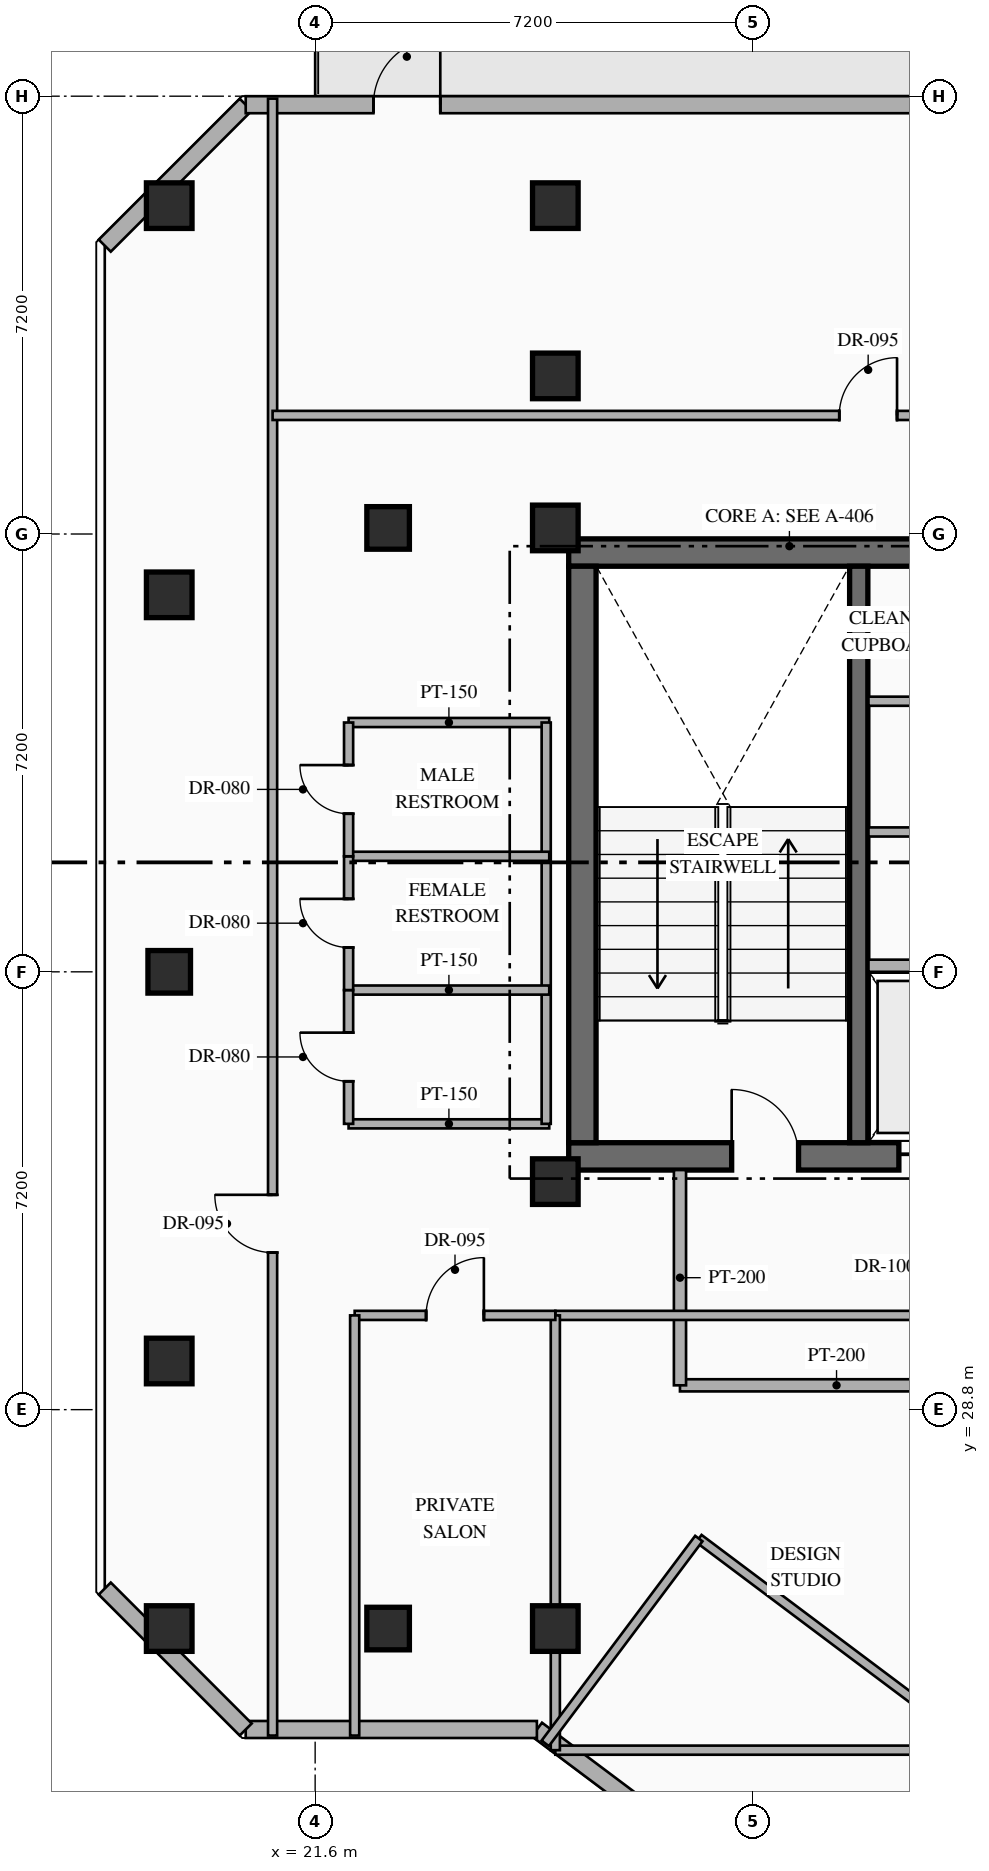
"""IFC4 building model, lengths in metres.
Left out: names, types, materials, properties, quantities, classifications, styles, units other than length and angle.
Written with IfcOpenShell. Run it as: python <this file> out.ifc"""

import sys

from ifc_helpers import new_model, si_unit, direction, frame, frame_2d, origin, origin_2d, place, context, subcontext, project, spatial, rectangle, hollow_rectangle, extrude, element, fill, save


model = new_model("IFC4")
c1 = context("Model", 3, precision=1e-05, world=origin(), true_north=direction((0.0, 1.0)))
c2 = subcontext(c1, "Body", "Model", "MODEL_VIEW")
j1 = project(units=[si_unit("LENGTHUNIT", "METRE"), si_unit("PLANEANGLEUNIT", "RADIAN")], contexts=[c1])
p1 = place(None, origin())
s1 = spatial("IfcSite", under=j1, at=p1, CompositionType="ELEMENT")
p2 = place(p1, origin())
s2 = spatial("IfcBuilding", under=s1, at=p2, CompositionType="ELEMENT")
p3 = place(p2, frame((0.0, 0.0, 205.95)))
s3 = spatial("IfcBuildingStorey", under=s2, at=p3, CompositionType="ELEMENT", Elevation=205.95)
p4 = place(p3, frame((25.77, 32.965, 0.0), z_axis=(0.0, 0.0, 1.0), x_axis=(1.0, 0.0, 0.0)))
e1 = element("IfcWall", 1, at=p4, inside=s3, PredefinedType="SHEAR", context=c2, shape_type="SweptSolid", body=[
    extrude(rectangle(XDim=7.48, YDim=0.45, at=frame_2d((3.74, 0.0))), origin(), (0.0, 0.0, 1.0), 3.6),
])
p5 = place(p4, frame((2.68, 0.0, 0.0)))
e2 = element("IfcOpeningElement", 2, at=p5, cuts=e1, PredefinedType="OPENING", context=c2, shape_type="SweptSolid", body=[
    extrude(rectangle(XDim=1.1, YDim=2.2, at=frame_2d((0.55, 1.1))), frame((0.0, 0.235, 0.0), z_axis=(0.0, -1.0, 0.0), x_axis=(1.0, 0.0, 0.0)), (0.0, 0.0, 1.0), 0.47),
])
p6 = place(p4, frame((5.43, 0.0, 0.0)))
e3 = element("IfcOpeningElement", 3, at=p6, cuts=e1, PredefinedType="OPENING", context=c2, shape_type="SweptSolid", body=[
    extrude(rectangle(XDim=1.1, YDim=2.15, at=frame_2d((0.55, 1.075))), frame((0.0, 0.235, 0.0), z_axis=(0.0, -1.0, 0.0), x_axis=(1.0, 0.0, 0.0)), (0.0, 0.0, 1.0), 0.47),
])
p7 = place(p3, frame((25.77, 42.895, 0.0), z_axis=(0.0, 0.0, 1.0), x_axis=(1.0, 0.0, 0.0)))
e4 = element("IfcWall", 4, at=p7, inside=s3, PredefinedType="SHEAR", context=c2, shape_type="SweptSolid", body=[
    extrude(rectangle(XDim=7.48, YDim=0.45, at=frame_2d((3.74, 0.0))), origin(), (0.0, 0.0, 1.0), 3.6),
])
p8 = place(p3, frame((25.995, 33.19, 0.0), z_axis=(0.0, 0.0, 1.0), x_axis=(0.0, 1.0, 0.0)))
e5 = element("IfcWall", 5, at=p8, inside=s3, PredefinedType="SHEAR", context=c2, shape_type="SweptSolid", body=[
    extrude(rectangle(XDim=9.48, YDim=0.45, at=frame_2d((4.74, 0.0))), origin(), (0.0, 0.0, 1.0), 3.6),
])
p9 = place(p3, frame((30.54, 33.19, 0.0), z_axis=(0.0, 0.0, 1.0), x_axis=(0.0, 1.0, 0.0)))
e6 = element("IfcWall", 6, at=p9, inside=s3, PredefinedType="SHEAR", context=c2, shape_type="SweptSolid", body=[
    extrude(rectangle(XDim=9.48, YDim=0.3, at=frame_2d((4.74, 0.0))), origin(), (0.0, 0.0, 1.0), 3.6),
])
for number, where, z_axis, x_axis in (
    (7, (25.55, 32.55, 0.0), (0.0, 0.0, 1.0), (1.0, 0.0, 0.0)),
    (8, (25.55, 43.3, 0.0), (0.0, 0.0, 1.0), (1.0, 0.0, 0.0)),
    (9, (25.55, 25.2, 0.0), (0.0, 0.0, 1.0), (1.0, 0.0, 0.0)),
    (10, (25.55, 45.8, 0.0), (0.0, 0.0, 1.0), (1.0, 0.0, 0.0)),
    (11, (19.2, 48.6, 0.0), (0.0, 0.0, 1.0), (1.0, 0.0, 0.0)),
    (12, (25.55, 48.6, 0.0), (0.0, 0.0, 1.0), (1.0, 0.0, 0.0)),
    (13, (19.2, 25.2, 0.0), (0.0, 0.0, 1.0), (1.0, 0.0, 0.0)),
    (14, (19.2, 29.6, 0.0), (0.0, 0.0, 1.0), (1.0, 0.0, 0.0)),
    (15, (19.2, 42.2, 0.0), (0.0, 0.0, 1.0), (1.0, 0.0, 0.0)),
):
    element("IfcColumn", number, at=place(p3, frame(where, z_axis=z_axis, x_axis=x_axis)), inside=s3, PredefinedType="COLUMN", context=c2, shape_type="SweptSolid", body=[
        extrude(hollow_rectangle(XDim=0.75, YDim=0.75, WallThickness=0.028, at=origin_2d()), origin(), (0.0, 0.0, 1.0), 3.6),
    ])
for number, where, z_axis, x_axis in (
    (16, (22.8, 25.2, 0.0), (0.0, 0.0, 1.0), (1.0, 0.0, 0.0)),
    (17, (22.8, 43.3, 0.0), (0.0, 0.0, 1.0), (1.0, 0.0, 0.0)),
    (18, (19.2, 36.0, 0.0), (0.0, 0.0, 1.0), (1.0, 0.0, 0.0)),
):
    element("IfcColumn", number, at=place(p3, frame(where, z_axis=z_axis, x_axis=x_axis)), inside=s3, PredefinedType="COLUMN", context=c2, shape_type="SweptSolid", body=[
        extrude(hollow_rectangle(XDim=0.7, YDim=0.7, WallThickness=0.028, at=origin_2d()), origin(), (0.0, 0.0, 1.0), 3.6),
    ])
p10 = place(p3, frame((44.918, 8.787, 0.0), z_axis=(0.0, 0.0, 1.0), x_axis=(-0.800004765927, 0.599993645378, 0.0)))
e19 = element("IfcWall", 19, at=p10, inside=s3, PredefinedType="STANDARD", context=c2, shape_type="SweptSolid", body=[
    extrude(rectangle(XDim=24.588, YDim=0.28, at=frame_2d((12.294, 0.0))), origin(), (0.0, 0.0, 1.0), 3.35),
])
p11 = place(p3, frame((25.247, 23.54, 0.0), z_axis=(0.0, 0.0, 1.0), x_axis=(-1.0, 0.0, 0.0)))
e20 = element("IfcWall", 20, at=p11, inside=s3, PredefinedType="STANDARD", context=c2, shape_type="SweptSolid", body=[
    extrude(rectangle(XDim=4.789, YDim=0.28, at=frame_2d((2.395, 0.0))), origin(), (0.0, 0.0, 1.0), 3.35),
])
p12 = place(p3, frame((20.458, 23.54, 0.0), z_axis=(0.0, 0.0, 1.0), x_axis=(-0.707144017911, 0.707069542501, 0.0)))
e21 = element("IfcWall", 21, at=p12, inside=s3, PredefinedType="STANDARD", context=c2, shape_type="SweptSolid", body=[
    extrude(rectangle(XDim=3.278, YDim=0.28, at=frame_2d((1.639, 0.0))), origin(), (0.0, 0.0, 1.0), 3.35),
])
p13 = place(p3, frame((18.14, 47.942, 0.0), z_axis=(0.0, 0.0, 1.0), x_axis=(0.707106781187, 0.707106781187, 0.0)))
e22 = element("IfcWall", 22, at=p13, inside=s3, PredefinedType="STANDARD", context=c2, shape_type="SweptSolid", body=[
    extrude(rectangle(XDim=3.278, YDim=0.28, at=frame_2d((1.639, 0.0))), origin(), (0.0, 0.0, 1.0), 3.35),
])
p14 = place(p3, frame((20.458, 50.26, 0.0), z_axis=(0.0, 0.0, 1.0), x_axis=(1.0, 0.0, 0.0)))
e23 = element("IfcWall", 23, at=p14, inside=s3, PredefinedType="STANDARD", context=c2, shape_type="SweptSolid", body=[
    extrude(rectangle(XDim=22.084, YDim=0.28, at=frame_2d((11.042, 0.0))), origin(), (0.0, 0.0, 1.0), 3.35),
])
p15 = place(p14, frame((2.1, 0.0, 0.0)))
e24 = element("IfcOpeningElement", 24, at=p15, cuts=e23, PredefinedType="OPENING", context=c2, shape_type="SweptSolid", body=[
    extrude(rectangle(XDim=1.1, YDim=2.2, at=frame_2d((0.55, 1.1))), frame((0.0, 0.15, 0.0), z_axis=(0.0, -1.0, 0.0), x_axis=(1.0, 0.0, 0.0)), (0.0, 0.0, 1.0), 0.3),
])
p16 = place(p14, frame((15.663, 0.0, 0.85)))
e25 = element("IfcOpeningElement", 25, at=p16, cuts=e23, PredefinedType="OPENING", context=c2, shape_type="SweptSolid", body=[
    extrude(rectangle(XDim=1.8, YDim=2.1, at=frame_2d((0.9, 1.05))), frame((0.0, 0.15, 0.0), z_axis=(0.0, -1.0, 0.0), x_axis=(1.0, 0.0, 0.0)), (0.0, 0.0, 1.0), 0.3),
])
p17 = place(p3, frame((30.7, 36.1, 0.0), z_axis=(0.0, 0.0, 1.0), x_axis=(1.0, 0.0, 0.0)))
e26 = element("IfcWall", 26, at=p17, inside=s3, PredefinedType="STANDARD", context=c2, shape_type="SweptSolid", body=[
    extrude(rectangle(XDim=2.1, YDim=0.2, at=frame_2d((1.05, 0.0))), origin(), (0.0, 0.0, 1.0), 3.35),
])
for number, where, z_axis, x_axis in (
    (27, (30.7, 38.3, 0.0), (0.0, 0.0, 1.0), (1.0, 0.0, 0.0)),
    (28, (30.7, 40.45, 0.0), (0.0, 0.0, 1.0), (1.0, 0.0, 0.0)),
):
    element("IfcWall", number, at=place(p3, frame(where, z_axis=z_axis, x_axis=x_axis)), inside=s3, PredefinedType="PARTITIONING", context=c2, shape_type="SweptSolid", body=[
        extrude(rectangle(XDim=2.1, YDim=0.15, at=frame_2d((1.05, 0.0))), origin(), (0.0, 0.0, 1.0), 3.35),
    ])
p18 = place(p3, frame((27.6, 29.2, 0.0), z_axis=(0.0, 0.0, 1.0), x_axis=(1.0, 0.0, 0.0)))
e29 = element("IfcWall", 29, at=p18, inside=s3, PredefinedType="STANDARD", context=c2, shape_type="SweptSolid", body=[
    extrude(rectangle(XDim=5.15, YDim=0.2, at=frame_2d((2.575, 0.0))), origin(), (0.0, 0.0, 1.0), 3.35),
])
p19 = place(p3, frame((27.6, 29.2, 0.0), z_axis=(0.0, 0.0, 1.0), x_axis=(0.0, 1.0, 0.0)))
e30 = element("IfcWall", 30, at=p19, inside=s3, PredefinedType="STANDARD", context=c2, shape_type="SweptSolid", body=[
    extrude(rectangle(XDim=3.54, YDim=0.2, at=frame_2d((1.77, 0.0))), origin(), (0.0, 0.0, 1.0), 3.35),
])
for number, where, z_axis, x_axis in (
    (31, (22.15, 33.5, 0.0), (0.0, 0.0, 1.0), (1.0, 0.0, 0.0)),
    (32, (22.15, 40.1, 0.0), (0.0, 0.0, 1.0), (1.0, 0.0, 0.0)),
):
    element("IfcWall", number, at=place(p3, frame(where, z_axis=z_axis, x_axis=x_axis)), inside=s3, PredefinedType="PARTITIONING", context=c2, shape_type="SweptSolid", body=[
        extrude(rectangle(XDim=3.3, YDim=0.15, at=frame_2d((1.65, 0.0))), origin(), (0.0, 0.0, 1.0), 3.35),
    ])
p20 = place(p3, frame((25.4, 33.5, 0.0), z_axis=(0.0, 0.0, 1.0), x_axis=(0.0, 1.0, 0.0)))
e33 = element("IfcWall", 33, at=p20, inside=s3, PredefinedType="PARTITIONING", context=c2, shape_type="SweptSolid", body=[
    extrude(rectangle(XDim=6.6, YDim=0.15, at=frame_2d((3.3, 0.0))), origin(), (0.0, 0.0, 1.0), 3.35),
])
for number, where, z_axis, x_axis in (
    (34, (22.15, 35.7, 0.0), (0.0, 0.0, 1.0), (1.0, 0.0, 0.0)),
    (35, (22.15, 37.9, 0.0), (0.0, 0.0, 1.0), (1.0, 0.0, 0.0)),
):
    element("IfcWall", number, at=place(p3, frame(where, z_axis=z_axis, x_axis=x_axis)), inside=s3, PredefinedType="PARTITIONING", context=c2, shape_type="SweptSolid", body=[
        extrude(rectangle(XDim=3.3, YDim=0.15, at=frame_2d((1.65, 0.0))), origin(), (0.0, 0.0, 1.0), 3.35),
    ])
p21 = place(p3, frame((22.15, 33.5, 0.0), z_axis=(0.0, 0.0, 1.0), x_axis=(0.0, 1.0, 0.0)))
e36 = element("IfcWall", 36, at=p21, inside=s3, PredefinedType="PARTITIONING", context=c2, shape_type="SweptSolid", body=[
    extrude(rectangle(XDim=2.2, YDim=0.15, at=frame_2d((1.1, 0.0))), origin(), (0.0, 0.0, 1.0), 3.35),
])
p22 = place(p21, frame((0.7, 0.0, 0.0)))
e37 = element("IfcOpeningElement", 37, at=p22, cuts=e36, PredefinedType="OPENING", context=c2, shape_type="SweptSolid", body=[
    extrude(rectangle(XDim=0.8, YDim=2.06, at=frame_2d((0.4, 1.03))), frame((0.0, 0.085, 0.0), z_axis=(0.0, -1.0, 0.0), x_axis=(1.0, 0.0, 0.0)), (0.0, 0.0, 1.0), 0.17),
])
p23 = place(p3, frame((22.15, 35.7, 0.0), z_axis=(0.0, 0.0, 1.0), x_axis=(0.0, 1.0, 0.0)))
e38 = element("IfcWall", 38, at=p23, inside=s3, PredefinedType="PARTITIONING", context=c2, shape_type="SweptSolid", body=[
    extrude(rectangle(XDim=2.2, YDim=0.15, at=frame_2d((1.1, 0.0))), origin(), (0.0, 0.0, 1.0), 3.35),
])
p24 = place(p23, frame((0.7, 0.0, 0.0)))
e39 = element("IfcOpeningElement", 39, at=p24, cuts=e38, PredefinedType="OPENING", context=c2, shape_type="SweptSolid", body=[
    extrude(rectangle(XDim=0.8, YDim=2.06, at=frame_2d((0.4, 1.03))), frame((0.0, 0.085, 0.0), z_axis=(0.0, -1.0, 0.0), x_axis=(1.0, 0.0, 0.0)), (0.0, 0.0, 1.0), 0.17),
])
p25 = place(p3, frame((22.15, 37.9, 0.0), z_axis=(0.0, 0.0, 1.0), x_axis=(0.0, 1.0, 0.0)))
e40 = element("IfcWall", 40, at=p25, inside=s3, PredefinedType="PARTITIONING", context=c2, shape_type="SweptSolid", body=[
    extrude(rectangle(XDim=2.2, YDim=0.15, at=frame_2d((1.1, 0.0))), origin(), (0.0, 0.0, 1.0), 3.35),
])
p26 = place(p25, frame((0.7, 0.0, 0.0)))
e41 = element("IfcOpeningElement", 41, at=p26, cuts=e40, PredefinedType="OPENING", context=c2, shape_type="SweptSolid", body=[
    extrude(rectangle(XDim=0.8, YDim=2.06, at=frame_2d((0.4, 1.03))), frame((0.0, 0.085, 0.0), z_axis=(0.0, -1.0, 0.0), x_axis=(1.0, 0.0, 0.0)), (0.0, 0.0, 1.0), 0.17),
])
p27 = place(p3, frame((25.55, 23.2, 0.0), z_axis=(0.0, 0.0, 1.0), x_axis=(1.0, 0.0, 0.0)))
e42 = element("IfcWall", 42, at=p27, inside=s3, PredefinedType="PARTITIONING", context=c2, shape_type="SweptSolid", body=[
    extrude(rectangle(XDim=9.4, YDim=0.15, at=frame_2d((4.7, 0.0))), origin(), (0.0, 0.0, 1.0), 3.35),
])
p28 = place(p3, frame((25.55, 30.35, 0.0), z_axis=(0.0, 0.0, 1.0), x_axis=(1.0, 0.0, 0.0)))
e43 = element("IfcWall", 43, at=p28, inside=s3, PredefinedType="PARTITIONING", context=c2, shape_type="SweptSolid", body=[
    extrude(rectangle(XDim=9.4, YDim=0.15, at=frame_2d((4.7, 0.0))), origin(), (0.0, 0.0, 1.0), 3.35),
])
p29 = place(p28, frame((7.638, 0.0, 0.0)))
e44 = element("IfcOpeningElement", 44, at=p29, cuts=e43, PredefinedType="OPENING", context=c2, shape_type="SweptSolid", body=[
    extrude(rectangle(XDim=1.0, YDim=2.15, at=frame_2d((0.5, 1.075))), frame((0.0, 0.085, 0.0), z_axis=(0.0, -1.0, 0.0), x_axis=(1.0, 0.0, 0.0)), (0.0, 0.0, 1.0), 0.17),
])
p30 = place(p3, frame((25.55, 23.2, 0.0), z_axis=(0.0, 0.0, 1.0), x_axis=(0.0, 1.0, 0.0)))
e45 = element("IfcWall", 45, at=p30, inside=s3, PredefinedType="PARTITIONING", context=c2, shape_type="SweptSolid", body=[
    extrude(rectangle(XDim=7.15, YDim=0.15, at=frame_2d((3.575, 0.0))), origin(), (0.0, 0.0, 1.0), 2.757),
])
p31 = place(p3, frame((20.9, 23.44, 0.0), z_axis=(0.0, 0.0, 1.0), x_axis=(0.0, 1.0, 0.0)))
e46 = element("IfcWall", 46, at=p31, inside=s3, PredefinedType="PARTITIONING", context=c2, shape_type="SweptSolid", body=[
    extrude(rectangle(XDim=26.92, YDim=0.15, at=frame_2d((13.46, 0.0))), origin(), (0.0, 0.0, 1.0), 3.35),
])
p32 = place(p31, frame((7.943, 0.0, 0.0)))
e47 = element("IfcOpeningElement", 47, at=p32, cuts=e46, PredefinedType="OPENING", context=c2, shape_type="SweptSolid", body=[
    extrude(rectangle(XDim=0.95, YDim=2.15, at=frame_2d((0.475, 1.075))), frame((0.0, 0.085, 0.0), z_axis=(0.0, -1.0, 0.0), x_axis=(1.0, 0.0, 0.0)), (0.0, 0.0, 1.0), 0.17),
])
p33 = place(p3, frame((20.9, 45.15, 0.0), z_axis=(0.0, 0.0, 1.0), x_axis=(1.0, 0.0, 0.0)))
e48 = element("IfcWall", 48, at=p33, inside=s3, PredefinedType="PARTITIONING", context=c2, shape_type="SweptSolid", body=[
    extrude(rectangle(XDim=24.06, YDim=0.15, at=frame_2d((12.03, 0.0))), origin(), (0.0, 0.0, 1.0), 3.35),
])
p34 = place(p33, frame((9.32, 0.0, 0.0)))
e49 = element("IfcOpeningElement", 49, at=p34, cuts=e48, PredefinedType="OPENING", context=c2, shape_type="SweptSolid", body=[
    extrude(rectangle(XDim=0.95, YDim=2.15, at=frame_2d((0.475, 1.075))), frame((0.0, 0.085, 0.0), z_axis=(0.0, -1.0, 0.0), x_axis=(1.0, 0.0, 0.0)), (0.0, 0.0, 1.0), 0.17),
])
p35 = place(p3, frame((22.25, 30.35, 0.0), z_axis=(0.0, 0.0, 1.0), x_axis=(1.0, 0.0, 0.0)))
e50 = element("IfcWall", 50, at=p35, inside=s3, PredefinedType="PARTITIONING", context=c2, shape_type="SweptSolid", body=[
    extrude(rectangle(XDim=3.3, YDim=0.15, at=frame_2d((1.65, 0.0))), origin(), (0.0, 0.0, 1.0), 3.35),
])
p36 = place(p35, frame((1.175, 0.0, 0.0)))
e51 = element("IfcOpeningElement", 51, at=p36, cuts=e50, PredefinedType="OPENING", context=c2, shape_type="SweptSolid", body=[
    extrude(rectangle(XDim=0.95, YDim=2.15, at=frame_2d((0.475, 1.075))), frame((0.0, 0.085, 0.0), z_axis=(0.0, -1.0, 0.0), x_axis=(1.0, 0.0, 0.0)), (0.0, 0.0, 1.0), 0.17),
])
p37 = place(p3, frame((22.25, 23.44, 0.0), z_axis=(0.0, 0.0, 1.0), x_axis=(0.0, 1.0, 0.0)))
e52 = element("IfcWall", 52, at=p37, inside=s3, PredefinedType="PARTITIONING", context=c2, shape_type="SweptSolid", body=[
    extrude(rectangle(XDim=6.91, YDim=0.15, at=frame_2d((3.455, 0.0))), origin(), (0.0, 0.0, 1.0), 3.35),
])
p38 = place(p3, frame((27.91, 26.68, 0.0), z_axis=(0.0, 0.0, 1.0), x_axis=(0.800005938517, -0.599992081896, 0.0)))
e53 = element("IfcWall", 53, at=p38, inside=s3, PredefinedType="PARTITIONING", context=c2, shape_type="SweptSolid", body=[
    extrude(rectangle(XDim=14.8, YDim=0.15, at=frame_2d((7.4, 0.0))), origin(), (0.0, 0.0, 1.0), 3.35),
])
p39 = place(p38, frame((9.281, 0.0, 0.0)))
e54 = element("IfcOpeningElement", 54, at=p39, cuts=e53, PredefinedType="OPENING", context=c2, shape_type="SweptSolid", body=[
    extrude(rectangle(XDim=0.95, YDim=2.15, at=frame_2d((0.475, 1.075))), frame((0.0, 0.085, 0.0), z_axis=(0.0, -1.0, 0.0), x_axis=(1.0, 0.0, 0.0)), (0.0, 0.0, 1.0), 0.17),
])
p40 = place(p3, frame((25.384, 23.312, 0.0), z_axis=(0.0, 0.0, 1.0), x_axis=(0.599990721155, 0.80000695905, 0.0)))
e55 = element("IfcWall", 55, at=p40, inside=s3, PredefinedType="PARTITIONING", context=c2, shape_type="SweptSolid", body=[
    extrude(rectangle(XDim=4.21, YDim=0.15, at=frame_2d((2.105, 0.0))), origin(), (0.0, 0.0, 1.0), 3.35),
])
p41 = place(p15, origin())
e56 = element("IfcDoor", 56, at=p41, inside=s3, OperationType="SINGLE_SWING_RIGHT", PredefinedType="DOOR", context=c2, shape_type="SweptSolid", body=[
    extrude(rectangle(XDim=1.1, YDim=2.2, at=frame_2d((0.55, 1.1))), frame((0.0, 0.025, 0.0), z_axis=(0.0, -1.0, 0.0), x_axis=(1.0, 0.0, 0.0)), (0.0, 0.0, 1.0), 0.05),
])
fill(e24, e56)
p42 = place(p5, origin())
e57 = element("IfcDoor", 57, at=p42, inside=s3, OperationType="SINGLE_SWING_LEFT", PredefinedType="DOOR", context=c2, shape_type="SweptSolid", body=[
    extrude(rectangle(XDim=1.1, YDim=2.2, at=frame_2d((0.55, 1.1))), frame((0.0, 0.025, 0.0), z_axis=(0.0, -1.0, 0.0), x_axis=(1.0, 0.0, 0.0)), (0.0, 0.0, 1.0), 0.05),
])
fill(e2, e57)
p43 = place(p6, origin())
e58 = element("IfcDoor", 58, at=p43, inside=s3, OperationType="SLIDING_TO_LEFT", PredefinedType="USERDEFINED", context=c2, shape_type="SweptSolid", body=[
    extrude(rectangle(XDim=1.1, YDim=2.15, at=frame_2d((0.55, 1.075))), frame((0.0, 0.025, 0.0), z_axis=(0.0, -1.0, 0.0), x_axis=(1.0, 0.0, 0.0)), (0.0, 0.0, 1.0), 0.05),
])
fill(e3, e58)
p44 = place(p22, origin())
e59 = element("IfcDoor", 59, at=p44, inside=s3, OperationType="SINGLE_SWING_RIGHT", PredefinedType="DOOR", context=c2, shape_type="SweptSolid", body=[
    extrude(rectangle(XDim=0.8, YDim=2.06, at=frame_2d((0.4, 1.03))), frame((0.0, 0.025, 0.0), z_axis=(0.0, -1.0, 0.0), x_axis=(1.0, 0.0, 0.0)), (0.0, 0.0, 1.0), 0.05),
])
fill(e37, e59)
p45 = place(p24, origin())
e60 = element("IfcDoor", 60, at=p45, inside=s3, OperationType="SINGLE_SWING_RIGHT", PredefinedType="DOOR", context=c2, shape_type="SweptSolid", body=[
    extrude(rectangle(XDim=0.8, YDim=2.06, at=frame_2d((0.4, 1.03))), frame((0.0, 0.025, 0.0), z_axis=(0.0, -1.0, 0.0), x_axis=(1.0, 0.0, 0.0)), (0.0, 0.0, 1.0), 0.05),
])
fill(e39, e60)
p46 = place(p26, origin())
e61 = element("IfcDoor", 61, at=p46, inside=s3, OperationType="SINGLE_SWING_RIGHT", PredefinedType="DOOR", context=c2, shape_type="SweptSolid", body=[
    extrude(rectangle(XDim=0.8, YDim=2.06, at=frame_2d((0.4, 1.03))), frame((0.0, 0.025, 0.0), z_axis=(0.0, -1.0, 0.0), x_axis=(1.0, 0.0, 0.0)), (0.0, 0.0, 1.0), 0.05),
])
fill(e41, e61)
p47 = place(p32, origin())
e62 = element("IfcDoor", 62, at=p47, inside=s3, OperationType="SINGLE_SWING_RIGHT", PredefinedType="DOOR", context=c2, shape_type="SweptSolid", body=[
    extrude(rectangle(XDim=0.95, YDim=2.15, at=frame_2d((0.475, 1.075))), frame((0.0, 0.025, 0.0), z_axis=(0.0, -1.0, 0.0), x_axis=(1.0, 0.0, 0.0)), (0.0, 0.0, 1.0), 0.05),
])
fill(e47, e62)
p48 = place(p34, origin())
e63 = element("IfcDoor", 63, at=p48, inside=s3, OperationType="SINGLE_SWING_RIGHT", PredefinedType="DOOR", context=c2, shape_type="SweptSolid", body=[
    extrude(rectangle(XDim=0.95, YDim=2.15, at=frame_2d((0.475, 1.075))), frame((0.0, 0.025, 0.0), z_axis=(0.0, -1.0, 0.0), x_axis=(1.0, 0.0, 0.0)), (0.0, 0.0, 1.0), 0.05),
])
fill(e49, e63)
p49 = place(p36, origin())
e64 = element("IfcDoor", 64, at=p49, inside=s3, OperationType="SINGLE_SWING_RIGHT", PredefinedType="DOOR", context=c2, shape_type="SweptSolid", body=[
    extrude(rectangle(XDim=0.95, YDim=2.15, at=frame_2d((0.475, 1.075))), frame((0.0, 0.025, 0.0), z_axis=(0.0, -1.0, 0.0), x_axis=(1.0, 0.0, 0.0)), (0.0, 0.0, 1.0), 0.05),
])
fill(e51, e64)
save(model, sys.argv[1])
